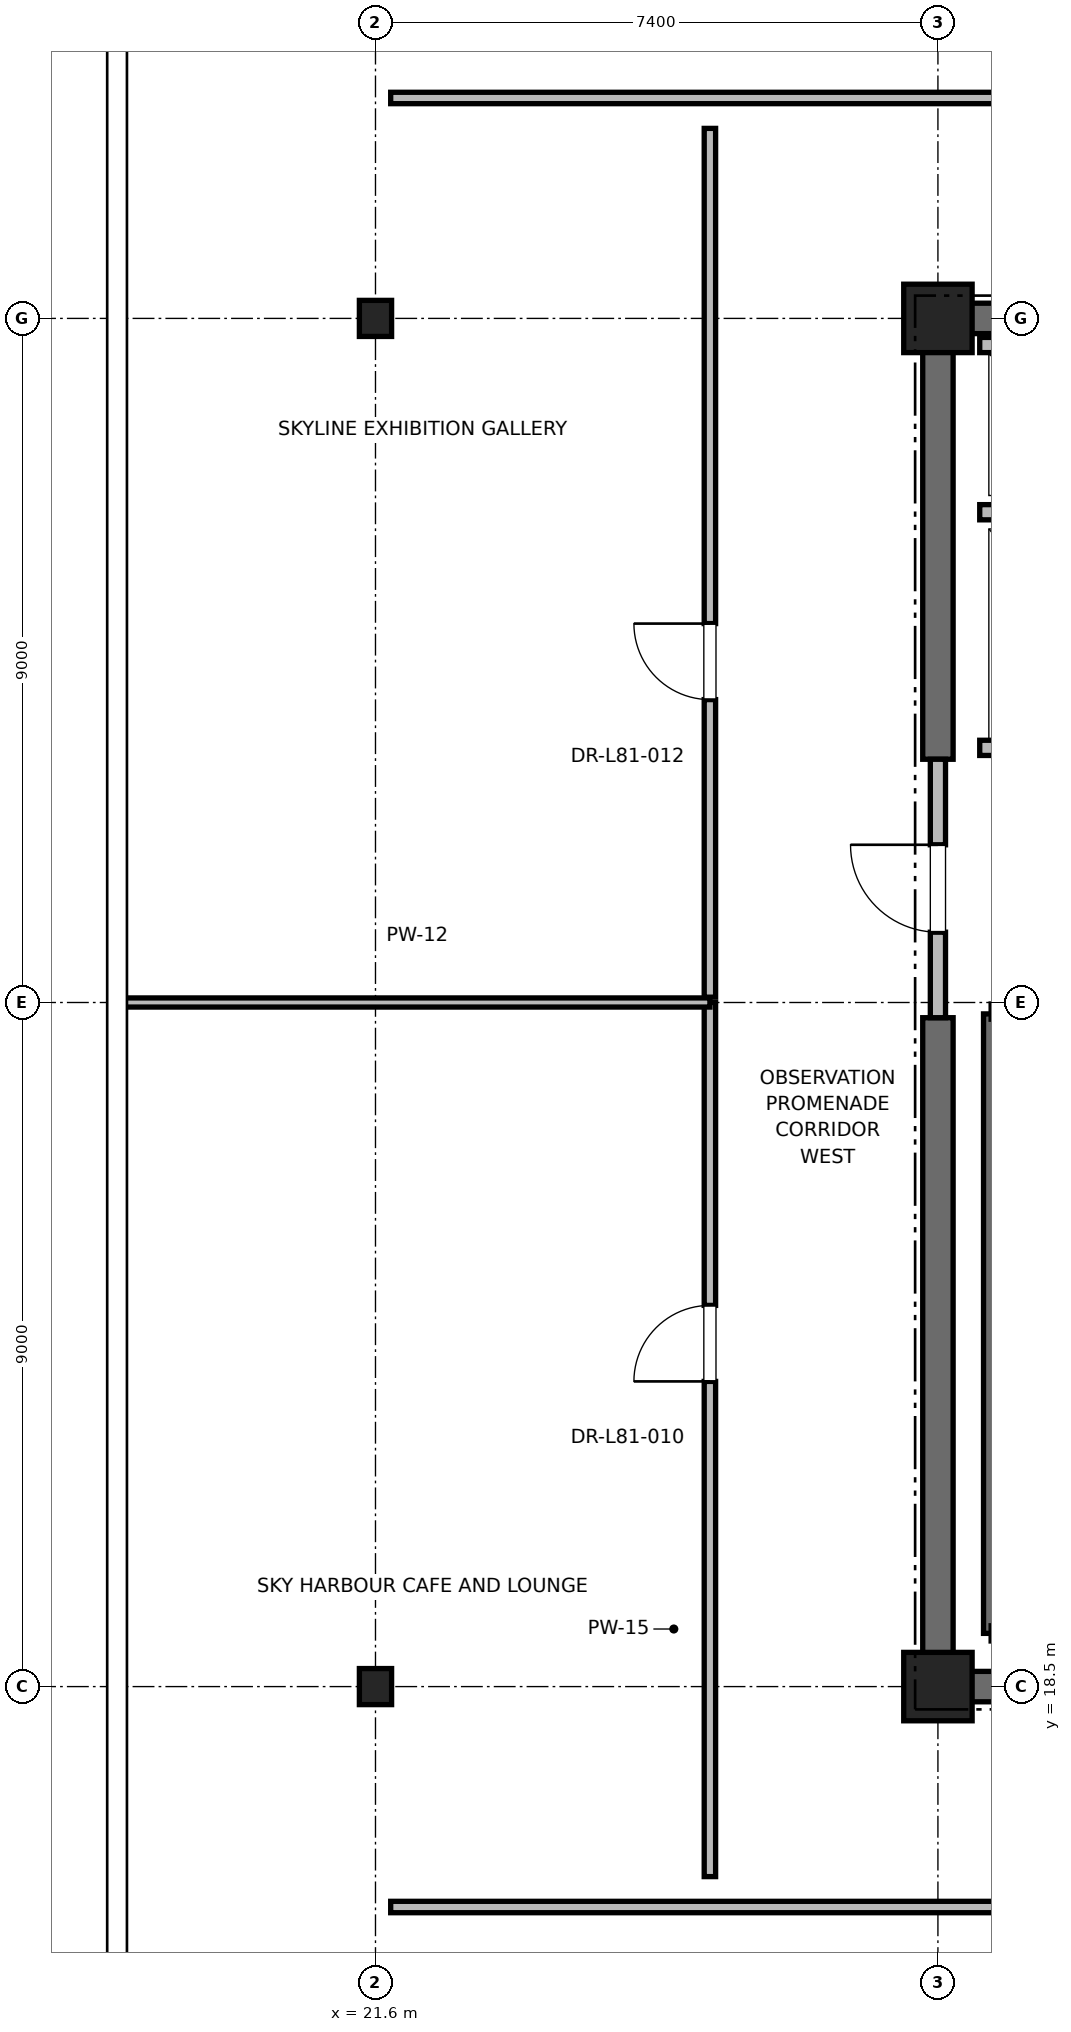
"""IFC4 building model, lengths in metres.
Left out: names, types, materials, properties, quantities, classifications, styles, units other than length and angle.
Written with IfcOpenShell. Run it as: python <this file> out.ifc"""

import sys

from ifc_helpers import new_model, si_unit, direction, frame, frame_2d, origin, origin_2d, place, context, subcontext, project, spatial, rectangle, i_section, extrude, element, fill, save


model = new_model("IFC4")
c1 = context("Model", 3, precision=1e-05, world=origin(), true_north=direction((0.0, 1.0)))
c2 = subcontext(c1, "Body", "Model", "MODEL_VIEW")
j1 = project(units=[si_unit("LENGTHUNIT", "METRE"), si_unit("PLANEANGLEUNIT", "RADIAN")], contexts=[c1])
p1 = place(None, origin())
s1 = spatial("IfcSite", under=j1, at=p1, CompositionType="ELEMENT")
p2 = place(p1, origin())
s2 = spatial("IfcBuilding", under=s1, at=p2, CompositionType="ELEMENT")
p3 = place(p2, frame((0.0, 0.0, 348.8)))
s3 = spatial("IfcBuildingStorey", under=s2, at=p3, CompositionType="ELEMENT", Elevation=348.8)
for number, where, z_axis, x_axis in (
    (1, (21.6, 18.5, 0.0), (0.0, 0.0, 1.0), (1.0, 0.0, 0.0)),
    (2, (21.6, 36.5, 0.0), (0.0, 0.0, 1.0), (1.0, 0.0, 0.0)),
):
    element("IfcColumn", number, at=place(p3, frame(where, z_axis=z_axis, x_axis=x_axis)), inside=s3, PredefinedType="COLUMN", context=c2, shape_type="SweptSolid", body=[
        extrude(i_section(OverallWidth=0.424, OverallDepth=0.475, WebThickness=0.048, FlangeThickness=0.077, FilletRadius=0.015, at=origin_2d()), origin(), (0.0, 0.0, 1.0), 5.5),
    ])
for number, where, z_axis, x_axis in (
    (3, (29.0, 18.5, 0.0), (0.0, 0.0, 1.0), (1.0, 0.0, 0.0)),
    (4, (29.0, 36.5, 0.0), (0.0, 0.0, 1.0), (1.0, 0.0, 0.0)),
):
    element("IfcColumn", number, at=place(p3, frame(where, z_axis=z_axis, x_axis=x_axis)), inside=s3, PredefinedType="PILASTER", context=c2, shape_type="SweptSolid", body=[
        extrude(rectangle(XDim=0.9, YDim=0.9, at=origin_2d()), origin(), (0.0, 0.0, 1.0), 5.5),
    ])
p4 = place(p3, frame((29.0, 18.5, 0.0), z_axis=(0.0, 0.0, 1.0), x_axis=(1.0, 0.0, 0.0)))
e5 = element("IfcWall", 5, at=p4, inside=s3, PredefinedType="SHEAR", context=c2, shape_type="SweptSolid", body=[
    extrude(rectangle(XDim=9.2, YDim=0.4, at=frame_2d((4.6, 0.0))), origin(), (0.0, 0.0, 1.0), 5.2),
])
p5 = place(p3, frame((29.0, 36.5, 0.0), z_axis=(0.0, 0.0, 1.0), x_axis=(1.0, 0.0, 0.0)))
e6 = element("IfcWall", 6, at=p5, inside=s3, PredefinedType="SHEAR", context=c2, shape_type="SweptSolid", body=[
    extrude(rectangle(XDim=5.8, YDim=0.4, at=frame_2d((2.9, 0.0))), origin(), (0.0, 0.0, 1.0), 5.2),
])
p6 = place(p3, frame((29.0, 18.5, 0.0), z_axis=(0.0, 0.0, 1.0), x_axis=(0.0, 1.0, 0.0)))
e7 = element("IfcWall", 7, at=p6, inside=s3, PredefinedType="SHEAR", context=c2, shape_type="SweptSolid", body=[
    extrude(rectangle(XDim=8.8, YDim=0.4, at=frame_2d((4.4, 0.0))), origin(), (0.0, 0.0, 1.0), 5.2),
])
p7 = place(p3, frame((29.0, 30.7, 0.0), z_axis=(0.0, 0.0, 1.0), x_axis=(0.0, 1.0, 0.0)))
e8 = element("IfcWall", 8, at=p7, inside=s3, PredefinedType="SHEAR", context=c2, shape_type="SweptSolid", body=[
    extrude(rectangle(XDim=5.8, YDim=0.4, at=frame_2d((2.9, 0.0))), origin(), (0.0, 0.0, 1.0), 5.2),
])
p8 = place(p3, frame((29.7, 19.2, 0.0), z_axis=(0.0, 0.0, 1.0), x_axis=(0.0, 1.0, 0.0)))
e9 = element("IfcWall", 9, at=p8, inside=s3, PredefinedType="SOLIDWALL", context=c2, shape_type="SweptSolid", body=[
    extrude(rectangle(XDim=8.15, YDim=0.2, at=frame_2d((4.075, 0.0))), origin(), (0.0, 0.0, 1.0), 5.2),
])
p9 = place(p3, frame((29.0, 27.3, 0.0), z_axis=(0.0, 0.0, 1.0), x_axis=(0.0, 1.0, 0.0)))
e10 = element("IfcWall", 10, at=p9, inside=s3, PredefinedType="PARTITIONING", context=c2, shape_type="SweptSolid", body=[
    extrude(rectangle(XDim=3.4, YDim=0.2, at=frame_2d((1.7, 0.0))), origin(), (0.0, 0.0, 1.0), 4.28),
])
p10 = place(p9, frame((1.125, 0.0, 0.0)))
e11 = element("IfcOpeningElement", 11, at=p10, cuts=e10, PredefinedType="OPENING", context=c2, shape_type="SweptSolid", body=[
    extrude(rectangle(XDim=1.15, YDim=2.2, at=frame_2d((0.575, 1.1))), frame((0.0, 0.1, 0.0), z_axis=(0.0, -1.0, 0.0), x_axis=(1.0, 0.0, 0.0)), (0.0, 0.0, 1.0), 0.2),
])
p11 = place(p3, frame((29.55, 30.85, 0.0), z_axis=(0.0, 0.0, 1.0), x_axis=(1.0, 0.0, 0.0)))
e12 = element("IfcWall", 12, at=p11, inside=s3, PredefinedType="SOLIDWALL", context=c2, shape_type="SweptSolid", body=[
    extrude(rectangle(XDim=2.6, YDim=0.2, at=frame_2d((1.3, 0.0))), origin(), (0.0, 0.0, 1.0), 4.28),
])
p12 = place(p11, frame((0.75, 0.0, 0.0)))
e13 = element("IfcOpeningElement", 13, at=p12, cuts=e12, PredefinedType="OPENING", context=c2, shape_type="SweptSolid", body=[
    extrude(rectangle(XDim=1.1, YDim=2.2, at=frame_2d((0.55, 1.1))), frame((0.0, 0.1, 0.0), z_axis=(0.0, -1.0, 0.0), x_axis=(1.0, 0.0, 0.0)), (0.0, 0.0, 1.0), 0.2),
])
p13 = place(p3, frame((29.55, 33.95, 0.0), z_axis=(0.0, 0.0, 1.0), x_axis=(1.0, 0.0, 0.0)))
e14 = element("IfcWall", 14, at=p13, inside=s3, PredefinedType="SOLIDWALL", context=c2, shape_type="SweptSolid", body=[
    extrude(rectangle(XDim=2.8, YDim=0.2, at=frame_2d((1.4, 0.0))), origin(), (0.0, 0.0, 1.0), 5.2),
])
p14 = place(p3, frame((32.35, 36.15, 0.0), z_axis=(0.0, 0.0, 1.0), x_axis=(-1.0, 0.0, 0.0)))
e15 = element("IfcWall", 15, at=p14, inside=s3, PredefinedType="SOLIDWALL", context=c2, shape_type="SweptSolid", body=[
    extrude(rectangle(XDim=2.8, YDim=0.2, at=frame_2d((1.4, 0.0))), origin(), (0.0, 0.0, 1.0), 4.635),
])
p15 = place(p3, frame((21.8, 39.4, 0.0), z_axis=(0.0, 0.0, 1.0), x_axis=(1.0, 0.0, 0.0)))
e16 = element("IfcWall", 16, at=p15, inside=s3, PredefinedType="PARTITIONING", context=c2, shape_type="SweptSolid", body=[
    extrude(rectangle(XDim=36.4, YDim=0.15, at=frame_2d((18.2, 0.0))), origin(), (0.0, 0.0, 1.0), 2.85),
])
p16 = place(p15, frame((17.7, 0.0, 0.0)))
e17 = element("IfcOpeningElement", 17, at=p16, cuts=e16, PredefinedType="OPENING", context=c2, shape_type="SweptSolid", body=[
    extrude(rectangle(XDim=1.0, YDim=2.15, at=frame_2d((0.5, 1.075))), frame((0.0, 0.075, 0.0), z_axis=(0.0, -1.0, 0.0), x_axis=(1.0, 0.0, 0.0)), (0.0, 0.0, 1.0), 0.15),
])
p17 = place(p3, frame((21.8, 15.6, 0.0), z_axis=(0.0, 0.0, 1.0), x_axis=(1.0, 0.0, 0.0)))
e18 = element("IfcWall", 18, at=p17, inside=s3, PredefinedType="PARTITIONING", context=c2, shape_type="SweptSolid", body=[
    extrude(rectangle(XDim=36.4, YDim=0.15, at=frame_2d((18.2, 0.0))), origin(), (0.0, 0.0, 1.0), 2.85),
])
p18 = place(p17, frame((17.7, 0.0, 0.0)))
e19 = element("IfcOpeningElement", 19, at=p18, cuts=e18, PredefinedType="OPENING", context=c2, shape_type="SweptSolid", body=[
    extrude(rectangle(XDim=1.0, YDim=2.15, at=frame_2d((0.5, 1.075))), frame((0.0, 0.075, 0.0), z_axis=(0.0, -1.0, 0.0), x_axis=(1.0, 0.0, 0.0)), (0.0, 0.0, 1.0), 0.15),
])
p19 = place(p3, frame((26.0, 16.0, 0.0), z_axis=(0.0, 0.0, 1.0), x_axis=(0.0, 1.0, 0.0)))
e20 = element("IfcWall", 20, at=p19, inside=s3, PredefinedType="PARTITIONING", context=c2, shape_type="SweptSolid", body=[
    extrude(rectangle(XDim=11.5, YDim=0.15, at=frame_2d((5.75, 0.0))), origin(), (0.0, 0.0, 1.0), 2.85),
])
p20 = place(p19, frame((6.515, 0.0, 0.0)))
e21 = element("IfcOpeningElement", 21, at=p20, cuts=e20, PredefinedType="OPENING", context=c2, shape_type="SweptSolid", body=[
    extrude(rectangle(XDim=1.0, YDim=2.15, at=frame_2d((0.5, 1.075))), frame((0.0, 0.075, 0.0), z_axis=(0.0, -1.0, 0.0), x_axis=(1.0, 0.0, 0.0)), (0.0, 0.0, 1.0), 0.15),
])
p21 = place(p3, frame((18.3, 27.5, 0.0), z_axis=(0.0, 0.0, 1.0), x_axis=(1.0, 0.0, 0.0)))
e22 = element("IfcWall", 22, at=p21, inside=s3, PredefinedType="PARTITIONING", context=c2, shape_type="SweptSolid", body=[
    extrude(rectangle(XDim=7.7, YDim=0.12, at=frame_2d((3.85, 0.0))), origin(), (0.0, 0.0, 1.0), 2.85),
])
p22 = place(p3, frame((26.0, 27.57, 0.0), z_axis=(0.0, 0.0, 1.0), x_axis=(0.0, 1.0, 0.0)))
e23 = element("IfcWall", 23, at=p22, inside=s3, PredefinedType="PARTITIONING", context=c2, shape_type="SweptSolid", body=[
    extrude(rectangle(XDim=11.43, YDim=0.15, at=frame_2d((5.715, 0.0))), origin(), (0.0, 0.0, 1.0), 2.85),
])
p23 = place(p22, frame((3.915, 0.0, 0.0)))
e24 = element("IfcOpeningElement", 24, at=p23, cuts=e23, PredefinedType="OPENING", context=c2, shape_type="SweptSolid", body=[
    extrude(rectangle(XDim=1.0, YDim=2.15, at=frame_2d((0.5, 1.075))), frame((0.0, 0.075, 0.0), z_axis=(0.0, -1.0, 0.0), x_axis=(1.0, 0.0, 0.0)), (0.0, 0.0, 1.0), 0.15),
])
p24 = place(p10, origin())
e25 = element("IfcDoor", 25, at=p24, inside=s3, OperationType="SINGLE_SWING_RIGHT", PredefinedType="DOOR", context=c2, shape_type="SweptSolid", body=[
    extrude(rectangle(XDim=1.15, YDim=2.2, at=frame_2d((0.575, 1.1))), frame((0.0, 0.025, 0.0), z_axis=(0.0, -1.0, 0.0), x_axis=(1.0, 0.0, 0.0)), (0.0, 0.0, 1.0), 0.05),
])
fill(e11, e25)
p25 = place(p20, origin())
e26 = element("IfcDoor", 26, at=p25, inside=s3, OperationType="SINGLE_SWING_LEFT", PredefinedType="DOOR", context=c2, shape_type="SweptSolid", body=[
    extrude(rectangle(XDim=1.0, YDim=2.15, at=frame_2d((0.5, 1.075))), frame((0.0, 0.025, 0.0), z_axis=(0.0, -1.0, 0.0), x_axis=(1.0, 0.0, 0.0)), (0.0, 0.0, 1.0), 0.05),
])
fill(e21, e26)
p26 = place(p23, origin())
e27 = element("IfcDoor", 27, at=p26, inside=s3, OperationType="SINGLE_SWING_RIGHT", PredefinedType="DOOR", context=c2, shape_type="SweptSolid", body=[
    extrude(rectangle(XDim=1.0, YDim=2.15, at=frame_2d((0.5, 1.075))), frame((0.0, 0.025, 0.0), z_axis=(0.0, -1.0, 0.0), x_axis=(1.0, 0.0, 0.0)), (0.0, 0.0, 1.0), 0.05),
])
fill(e24, e27)
save(model, sys.argv[1])
